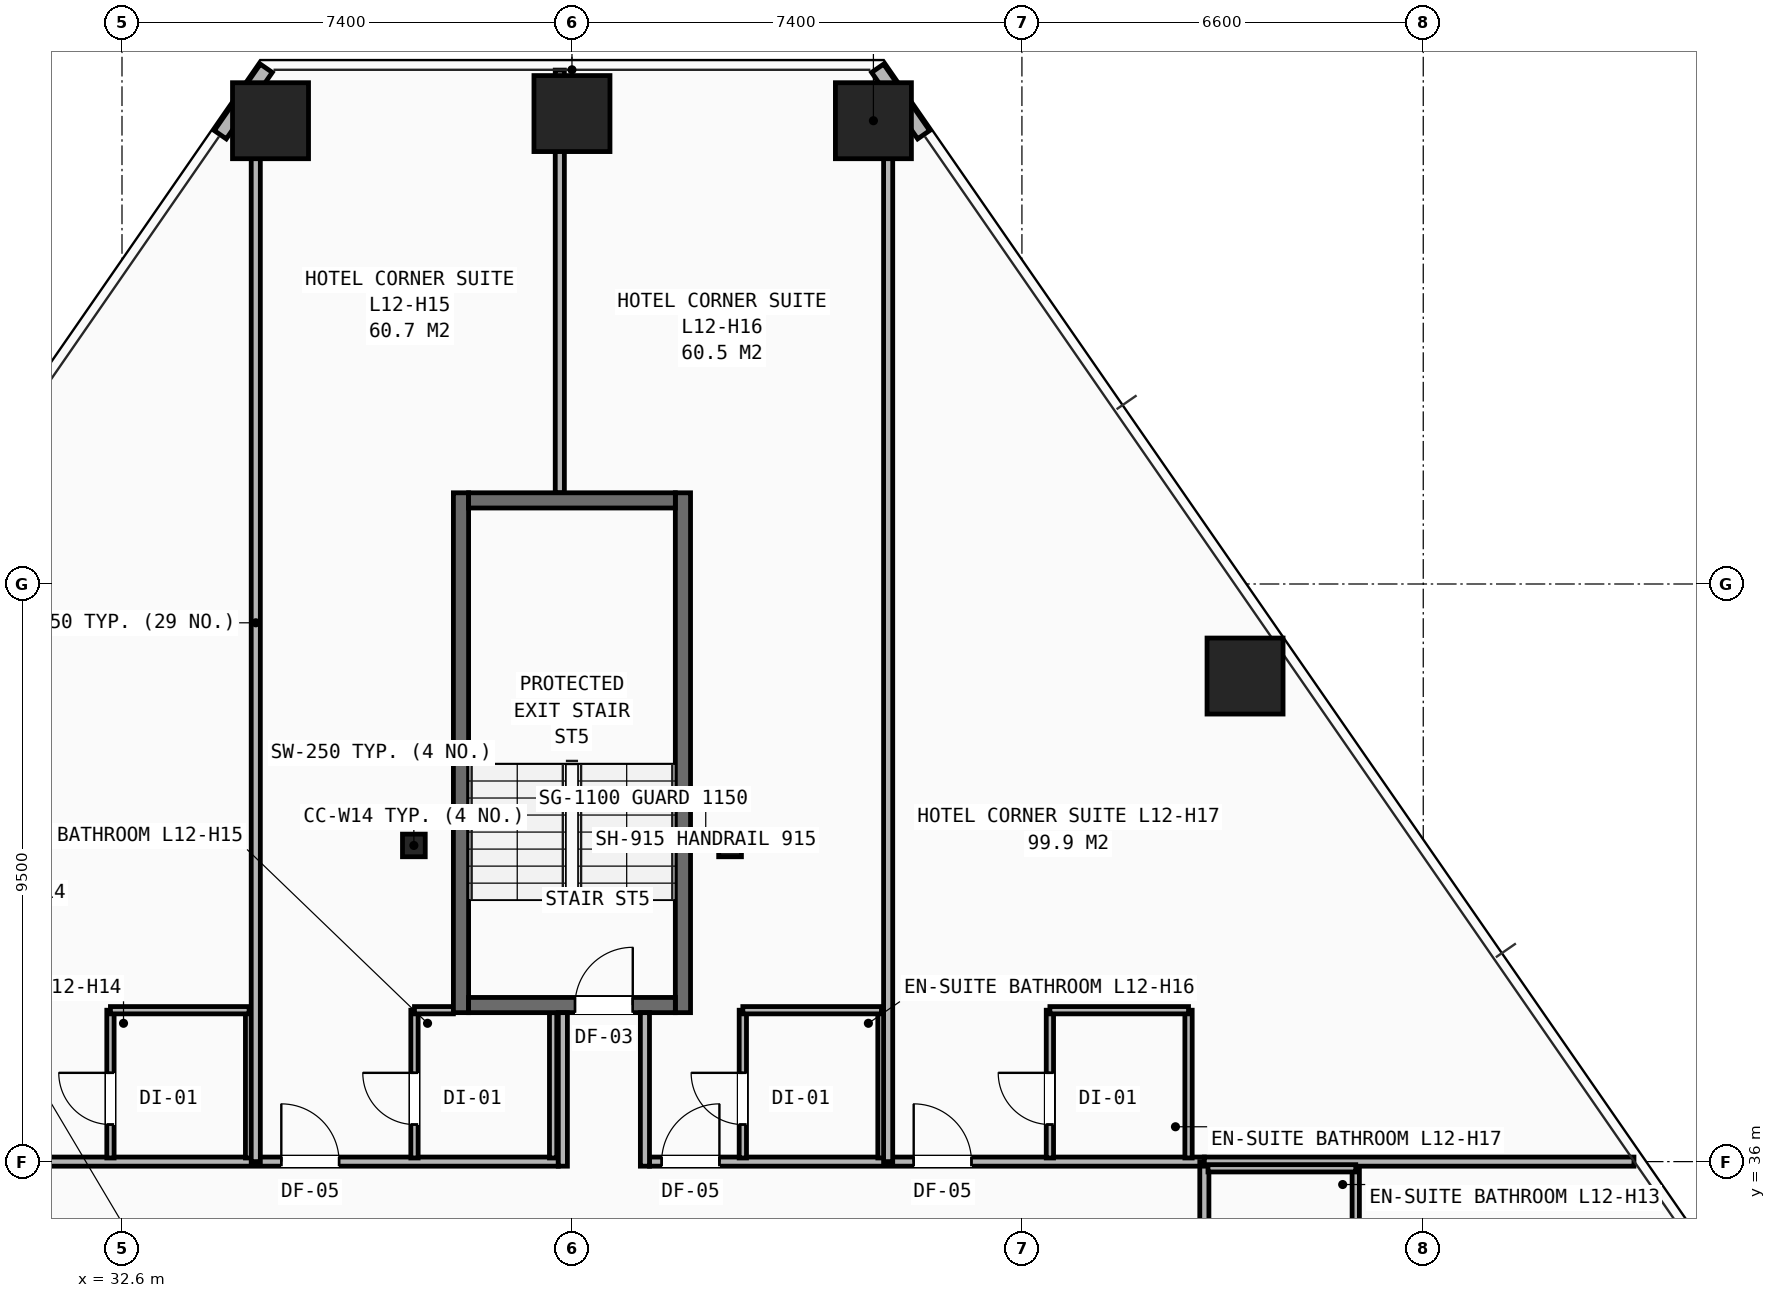
"""IFC4 building model, lengths in metres.
Left out: names, types, materials, properties, quantities, classifications, styles, units other than length and angle.
Written with IfcOpenShell. Run it as: python <this file> out.ifc"""

import sys

from ifc_helpers import new_model, si_unit, direction, frame, frame_2d, origin, origin_2d, place, context, subcontext, project, spatial, rectangle, hollow_rectangle, i_section, extrude, element, fill, save


model = new_model("IFC4")
c1 = context("Model", 3, precision=1e-05, world=origin(), true_north=direction((0.0, 1.0)))
c2 = subcontext(c1, "Body", "Model", "MODEL_VIEW")
j1 = project(units=[si_unit("LENGTHUNIT", "METRE"), si_unit("PLANEANGLEUNIT", "RADIAN")], contexts=[c1])
p1 = place(None, origin())
s1 = spatial("IfcSite", under=j1, at=p1, CompositionType="ELEMENT")
p2 = place(p1, origin())
s2 = spatial("IfcBuilding", under=s1, at=p2, CompositionType="ELEMENT")
p3 = place(p2, frame((0.0, 0.0, 46.4)))
s3 = spatial("IfcBuildingStorey", under=s2, at=p3, CompositionType="ELEMENT", Elevation=46.4)
for number, where, z_axis, x_axis in (
    (1, (37.4, 41.2, 0.0), (0.0, 0.0, 1.0), (1.0, 0.0, 0.0)),
    (2, (42.6, 41.2, 0.0), (0.0, 0.0, 1.0), (1.0, 0.0, 0.0)),
):
    element("IfcColumn", number, at=place(p3, frame(where, z_axis=z_axis, x_axis=x_axis)), inside=s3, PredefinedType="COLUMN", context=c2, shape_type="SweptSolid", body=[
        extrude(i_section(OverallWidth=0.374, OverallDepth=0.372, WebThickness=0.016, FlangeThickness=0.026, at=origin_2d()), origin(), (0.0, 0.0, 1.0), 3.2),
    ])
for number, where, z_axis, x_axis in (
    (3, (44.958, 53.12, 0.0), (0.0, 0.0, 1.0), (1.0, 0.0, 0.0)),
    (4, (40.0, 53.237, 0.0), (0.0, 0.0, 1.0), (1.0, 0.0, 0.0)),
    (5, (35.042, 53.12, 0.0), (0.0, 0.0, 1.0), (1.0, 0.0, 0.0)),
    (6, (51.069, 43.986, 0.0), (0.0, 0.0, 1.0), (1.0, 0.0, 0.0)),
):
    element("IfcColumn", number, at=place(p3, frame(where, z_axis=z_axis, x_axis=x_axis)), inside=s3, PredefinedType="COLUMN", context=c2, shape_type="SweptSolid", body=[
        extrude(hollow_rectangle(XDim=1.25, YDim=1.25, WallThickness=0.08, at=origin_2d()), origin(), (0.0, 0.0, 1.0), 3.2),
    ])
for number, where, z_axis, x_axis in (
    (7, (34.973, 53.982, 0.0), (0.0, 0.0, 1.0), (-0.569, -0.822, 0.0)),
    (8, (45.784, 52.889, 0.0), (0.0, 0.0, 1.0), (-0.569, 0.822, 0.0)),
):
    element("IfcWall", number, at=place(p3, frame(where, z_axis=z_axis, x_axis=x_axis)), inside=s3, PredefinedType="SHEAR", context=c2, shape_type="SweptSolid", body=[
        extrude(rectangle(XDim=1.33, YDim=0.24, at=frame_2d((0.665, 0.0))), origin(), (0.0, 0.0, 1.0), 2.263),
    ])
p4 = place(p3, frame((29.6, 36.0, 0.0), z_axis=(0.0, 0.0, 1.0), x_axis=(1.0, 0.0, 0.0)))
e9 = element("IfcWall", 9, at=p4, inside=s3, PredefinedType="PARTITIONING", context=c2, shape_type="SweptSolid", body=[
    extrude(rectangle(XDim=10.175, YDim=0.15, at=frame_2d((5.087, 0.0))), origin(), (0.0, 0.0, 1.0), 2.98),
])
p5 = place(p4, frame((0.57, 0.0, 0.0)))
e10 = element("IfcOpeningElement", 10, at=p5, cuts=e9, PredefinedType="OPENING", context=c2, shape_type="SweptSolid", body=[
    extrude(rectangle(XDim=0.95, YDim=2.1, at=frame_2d((0.475, 1.05))), frame((0.0, 0.085, 0.0), z_axis=(0.0, -1.0, 0.0), x_axis=(1.0, 0.0, 0.0)), (0.0, 0.0, 1.0), 0.17),
])
p6 = place(p4, frame((5.62, 0.0, 0.0)))
e11 = element("IfcOpeningElement", 11, at=p6, cuts=e9, PredefinedType="OPENING", context=c2, shape_type="SweptSolid", body=[
    extrude(rectangle(XDim=0.95, YDim=2.1, at=frame_2d((0.475, 1.05))), frame((0.0, 0.085, 0.0), z_axis=(0.0, -1.0, 0.0), x_axis=(1.0, 0.0, 0.0)), (0.0, 0.0, 1.0), 0.17),
])
p7 = place(p3, frame((41.275, 36.0, 0.0), z_axis=(0.0, 0.0, 1.0), x_axis=(1.0, 0.0, 0.0)))
e12 = element("IfcWall", 12, at=p7, inside=s3, PredefinedType="PARTITIONING", context=c2, shape_type="SweptSolid", body=[
    extrude(rectangle(XDim=9.125, YDim=0.15, at=frame_2d((4.562, 0.0))), origin(), (0.0, 0.0, 1.0), 2.513),
])
p8 = place(p7, frame((0.2, 0.0, 0.0)))
e13 = element("IfcOpeningElement", 13, at=p8, cuts=e12, PredefinedType="OPENING", context=c2, shape_type="SweptSolid", body=[
    extrude(rectangle(XDim=0.95, YDim=2.1, at=frame_2d((0.475, 1.05))), frame((0.0, 0.085, 0.0), z_axis=(0.0, -1.0, 0.0), x_axis=(1.0, 0.0, 0.0)), (0.0, 0.0, 1.0), 0.17),
])
p9 = place(p7, frame((4.345, 0.0, 0.0)))
e14 = element("IfcOpeningElement", 14, at=p9, cuts=e12, PredefinedType="OPENING", context=c2, shape_type="SweptSolid", body=[
    extrude(rectangle(XDim=0.95, YDim=2.1, at=frame_2d((0.475, 1.05))), frame((0.0, 0.085, 0.0), z_axis=(0.0, -1.0, 0.0), x_axis=(1.0, 0.0, 0.0)), (0.0, 0.0, 1.0), 0.17),
])
p10 = place(p3, frame((50.4, 14.1, 0.0), z_axis=(0.0, 0.0, 1.0), x_axis=(0.0, 1.0, 0.0)))
e15 = element("IfcWall", 15, at=p10, inside=s3, PredefinedType="PARTITIONING", context=c2, shape_type="SweptSolid", body=[
    extrude(rectangle(XDim=21.9, YDim=0.15, at=frame_2d((10.95, 0.0))), origin(), (0.0, 0.0, 1.0), 2.431),
])
p11 = place(p10, frame((0.42, 0.0, 0.0)))
e16 = element("IfcOpeningElement", 16, at=p11, cuts=e15, PredefinedType="OPENING", context=c2, shape_type="SweptSolid", body=[
    extrude(rectangle(XDim=0.95, YDim=2.1, at=frame_2d((0.475, 1.05))), frame((0.0, 0.085, 0.0), z_axis=(0.0, -1.0, 0.0), x_axis=(1.0, 0.0, 0.0)), (0.0, 0.0, 1.0), 0.17),
])
p12 = place(p10, frame((5.72, 0.0, 0.0)))
e17 = element("IfcOpeningElement", 17, at=p12, cuts=e15, PredefinedType="OPENING", context=c2, shape_type="SweptSolid", body=[
    extrude(rectangle(XDim=0.95, YDim=2.1, at=frame_2d((0.475, 1.05))), frame((0.0, 0.085, 0.0), z_axis=(0.0, -1.0, 0.0), x_axis=(1.0, 0.0, 0.0)), (0.0, 0.0, 1.0), 0.17),
])
p13 = place(p10, frame((11.12, 0.0, 0.0)))
e18 = element("IfcOpeningElement", 18, at=p13, cuts=e15, PredefinedType="OPENING", context=c2, shape_type="SweptSolid", body=[
    extrude(rectangle(XDim=0.95, YDim=2.1, at=frame_2d((0.475, 1.05))), frame((0.0, 0.085, 0.0), z_axis=(0.0, -1.0, 0.0), x_axis=(1.0, 0.0, 0.0)), (0.0, 0.0, 1.0), 0.17),
])
p14 = place(p10, frame((16.72, 0.0, 0.0)))
e19 = element("IfcOpeningElement", 19, at=p14, cuts=e15, PredefinedType="OPENING", context=c2, shape_type="SweptSolid", body=[
    extrude(rectangle(XDim=0.95, YDim=2.1, at=frame_2d((0.475, 1.05))), frame((0.0, 0.085, 0.0), z_axis=(0.0, -1.0, 0.0), x_axis=(1.0, 0.0, 0.0)), (0.0, 0.0, 1.0), 0.17),
])
p15 = place(p3, frame((50.4, 36.0, 0.0), z_axis=(0.0, 0.0, 1.0), x_axis=(1.0, 0.0, 0.0)))
e20 = element("IfcWall", 20, at=p15, inside=s3, PredefinedType="PARTITIONING", context=c2, shape_type="SweptSolid", body=[
    extrude(rectangle(XDim=7.065, YDim=0.15, at=frame_2d((3.533, 0.0))), origin(), (0.0, 0.0, 1.0), 2.268),
])
p16 = place(p3, frame((52.89, 33.61, 0.0), z_axis=(0.0, 0.0, 1.0), x_axis=(0.0, 1.0, 0.0)))
e21 = element("IfcWall", 21, at=p16, inside=s3, PredefinedType="PARTITIONING", context=c2, shape_type="SweptSolid", body=[
    extrude(rectangle(XDim=2.28, YDim=0.12, at=frame_2d((1.14, 0.0))), origin(), (0.0, 0.0, 1.0), 2.98),
])
p17 = place(p3, frame((50.46, 35.89, 0.0), z_axis=(0.0, 0.0, 1.0), x_axis=(1.0, 0.0, 0.0)))
e22 = element("IfcWall", 22, at=p17, inside=s3, PredefinedType="PARTITIONING", context=c2, shape_type="SweptSolid", body=[
    extrude(rectangle(XDim=2.43, YDim=0.12, at=frame_2d((1.215, 0.0))), origin(), (0.0, 0.0, 1.0), 2.513),
])
p18 = place(p3, frame((32.41, 36.06, 0.0), z_axis=(0.0, 0.0, 1.0), x_axis=(0.0, 1.0, 0.0)))
e23 = element("IfcWall", 23, at=p18, inside=s3, PredefinedType="PARTITIONING", context=c2, shape_type="SweptSolid", body=[
    extrude(rectangle(XDim=2.43, YDim=0.12, at=frame_2d((1.215, 0.0))), origin(), (0.0, 0.0, 1.0), 2.98),
])
p19 = place(p18, frame((0.55, 0.0, 0.0)))
e24 = element("IfcOpeningElement", 24, at=p19, cuts=e23, PredefinedType="OPENING", context=c2, shape_type="SweptSolid", body=[
    extrude(rectangle(XDim=0.85, YDim=2.05, at=frame_2d((0.425, 1.025))), frame((0.0, 0.07, 0.0), z_axis=(0.0, -1.0, 0.0), x_axis=(1.0, 0.0, 0.0)), (0.0, 0.0, 1.0), 0.14),
])
p20 = place(p3, frame((34.69, 36.06, 0.0), z_axis=(0.0, 0.0, 1.0), x_axis=(0.0, 1.0, 0.0)))
e25 = element("IfcWall", 25, at=p20, inside=s3, PredefinedType="PARTITIONING", context=c2, shape_type="SweptSolid", body=[
    extrude(rectangle(XDim=2.43, YDim=0.12, at=frame_2d((1.215, 0.0))), origin(), (0.0, 0.0, 1.0), 2.98),
])
p21 = place(p3, frame((32.41, 38.49, 0.0), z_axis=(0.0, 0.0, 1.0), x_axis=(1.0, 0.0, 0.0)))
e26 = element("IfcWall", 26, at=p21, inside=s3, PredefinedType="PARTITIONING", context=c2, shape_type="SweptSolid", body=[
    extrude(rectangle(XDim=2.28, YDim=0.12, at=frame_2d((1.14, 0.0))), origin(), (0.0, 0.0, 1.0), 2.98),
])
p22 = place(p3, frame((34.8, 36.0, 0.0), z_axis=(0.0, 0.0, 1.0), x_axis=(0.0, 1.0, 0.0)))
e27 = element("IfcWall", 27, at=p22, inside=s3, PredefinedType="PARTITIONING", context=c2, shape_type="SweptSolid", body=[
    extrude(rectangle(XDim=17.724, YDim=0.15, at=frame_2d((8.862, 0.0))), origin(), (0.0, 0.0, 1.0), 2.268),
])
p23 = place(p3, frame((37.41, 36.06, 0.0), z_axis=(0.0, 0.0, 1.0), x_axis=(0.0, 1.0, 0.0)))
e28 = element("IfcWall", 28, at=p23, inside=s3, PredefinedType="PARTITIONING", context=c2, shape_type="SweptSolid", body=[
    extrude(rectangle(XDim=2.43, YDim=0.12, at=frame_2d((1.215, 0.0))), origin(), (0.0, 0.0, 1.0), 2.98),
])
p24 = place(p23, frame((0.55, 0.0, 0.0)))
e29 = element("IfcOpeningElement", 29, at=p24, cuts=e28, PredefinedType="OPENING", context=c2, shape_type="SweptSolid", body=[
    extrude(rectangle(XDim=0.85, YDim=2.05, at=frame_2d((0.425, 1.025))), frame((0.0, 0.07, 0.0), z_axis=(0.0, -1.0, 0.0), x_axis=(1.0, 0.0, 0.0)), (0.0, 0.0, 1.0), 0.14),
])
p25 = place(p3, frame((39.69, 36.06, 0.0), z_axis=(0.0, 0.0, 1.0), x_axis=(0.0, 1.0, 0.0)))
e30 = element("IfcWall", 30, at=p25, inside=s3, PredefinedType="PARTITIONING", context=c2, shape_type="SweptSolid", body=[
    extrude(rectangle(XDim=2.39, YDim=0.12, at=frame_2d((1.195, 0.0))), origin(), (0.0, 0.0, 1.0), 2.98),
])
p26 = place(p3, frame((37.41, 38.49, 0.0), z_axis=(0.0, 0.0, 1.0), x_axis=(1.0, 0.0, 0.0)))
e31 = element("IfcWall", 31, at=p26, inside=s3, PredefinedType="PARTITIONING", context=c2, shape_type="SweptSolid", body=[
    extrude(rectangle(XDim=0.64, YDim=0.12, at=frame_2d((0.32, 0.0))), origin(), (0.0, 0.0, 1.0), 2.98),
])
p27 = place(p3, frame((39.8, 47.0, 0.0), z_axis=(0.0, 0.0, 1.0), x_axis=(0.0, 1.0, 0.0)))
e32 = element("IfcWall", 32, at=p27, inside=s3, PredefinedType="PARTITIONING", context=c2, shape_type="SweptSolid", body=[
    extrude(rectangle(XDim=6.952, YDim=0.15, at=frame_2d((3.476, 0.0))), origin(), (0.0, 0.0, 1.0), 2.268),
])
p28 = place(p3, frame((42.81, 36.06, 0.0), z_axis=(0.0, 0.0, 1.0), x_axis=(0.0, 1.0, 0.0)))
e33 = element("IfcWall", 33, at=p28, inside=s3, PredefinedType="PARTITIONING", context=c2, shape_type="SweptSolid", body=[
    extrude(rectangle(XDim=2.43, YDim=0.12, at=frame_2d((1.215, 0.0))), origin(), (0.0, 0.0, 1.0), 2.98),
])
p29 = place(p28, frame((0.55, 0.0, 0.0)))
e34 = element("IfcOpeningElement", 34, at=p29, cuts=e33, PredefinedType="OPENING", context=c2, shape_type="SweptSolid", body=[
    extrude(rectangle(XDim=0.85, YDim=2.05, at=frame_2d((0.425, 1.025))), frame((0.0, 0.07, 0.0), z_axis=(0.0, -1.0, 0.0), x_axis=(1.0, 0.0, 0.0)), (0.0, 0.0, 1.0), 0.14),
])
p30 = place(p3, frame((45.09, 36.06, 0.0), z_axis=(0.0, 0.0, 1.0), x_axis=(0.0, 1.0, 0.0)))
e35 = element("IfcWall", 35, at=p30, inside=s3, PredefinedType="PARTITIONING", context=c2, shape_type="SweptSolid", body=[
    extrude(rectangle(XDim=2.43, YDim=0.12, at=frame_2d((1.215, 0.0))), origin(), (0.0, 0.0, 1.0), 2.98),
])
p31 = place(p3, frame((42.81, 38.49, 0.0), z_axis=(0.0, 0.0, 1.0), x_axis=(1.0, 0.0, 0.0)))
e36 = element("IfcWall", 36, at=p31, inside=s3, PredefinedType="PARTITIONING", context=c2, shape_type="SweptSolid", body=[
    extrude(rectangle(XDim=2.28, YDim=0.12, at=frame_2d((1.14, 0.0))), origin(), (0.0, 0.0, 1.0), 2.98),
])
p32 = place(p3, frame((45.2, 36.0, 0.0), z_axis=(0.0, 0.0, 1.0), x_axis=(0.0, 1.0, 0.0)))
e37 = element("IfcWall", 37, at=p32, inside=s3, PredefinedType="PARTITIONING", context=c2, shape_type="SweptSolid", body=[
    extrude(rectangle(XDim=17.724, YDim=0.15, at=frame_2d((8.862, 0.0))), origin(), (0.0, 0.0, 1.0), 2.268),
])
p33 = place(p3, frame((47.86, 36.06, 0.0), z_axis=(0.0, 0.0, 1.0), x_axis=(0.0, 1.0, 0.0)))
e38 = element("IfcWall", 38, at=p33, inside=s3, PredefinedType="PARTITIONING", context=c2, shape_type="SweptSolid", body=[
    extrude(rectangle(XDim=2.43, YDim=0.12, at=frame_2d((1.215, 0.0))), origin(), (0.0, 0.0, 1.0), 2.98),
])
p34 = place(p33, frame((0.55, 0.0, 0.0)))
e39 = element("IfcOpeningElement", 39, at=p34, cuts=e38, PredefinedType="OPENING", context=c2, shape_type="SweptSolid", body=[
    extrude(rectangle(XDim=0.85, YDim=2.05, at=frame_2d((0.425, 1.025))), frame((0.0, 0.07, 0.0), z_axis=(0.0, -1.0, 0.0), x_axis=(1.0, 0.0, 0.0)), (0.0, 0.0, 1.0), 0.14),
])
p35 = place(p3, frame((50.14, 36.06, 0.0), z_axis=(0.0, 0.0, 1.0), x_axis=(0.0, 1.0, 0.0)))
e40 = element("IfcWall", 40, at=p35, inside=s3, PredefinedType="PARTITIONING", context=c2, shape_type="SweptSolid", body=[
    extrude(rectangle(XDim=2.43, YDim=0.12, at=frame_2d((1.215, 0.0))), origin(), (0.0, 0.0, 1.0), 2.513),
])
p36 = place(p3, frame((47.86, 38.49, 0.0), z_axis=(0.0, 0.0, 1.0), x_axis=(1.0, 0.0, 0.0)))
e41 = element("IfcWall", 41, at=p36, inside=s3, PredefinedType="PARTITIONING", context=c2, shape_type="SweptSolid", body=[
    extrude(rectangle(XDim=2.28, YDim=0.12, at=frame_2d((1.14, 0.0))), origin(), (0.0, 0.0, 1.0), 2.513),
])
for number, where, z_axis, x_axis in (
    (42, (38.175, 38.45, 0.0), (0.0, 0.0, 1.0), (0.0, 1.0, 0.0)),
    (43, (41.825, 38.45, 0.0), (0.0, 0.0, 1.0), (0.0, 1.0, 0.0)),
):
    element("IfcWall", number, at=place(p3, frame(where, z_axis=z_axis, x_axis=x_axis)), inside=s3, PredefinedType="SHEAR", context=c2, shape_type="SweptSolid", body=[
        extrude(rectangle(XDim=8.55, YDim=0.25, at=frame_2d((4.275, 0.0))), origin(), (0.0, 0.0, 1.0), 2.98),
    ])
p37 = place(p3, frame((38.3, 38.575, 0.0), z_axis=(0.0, 0.0, 1.0), x_axis=(1.0, 0.0, 0.0)))
e44 = element("IfcWall", 44, at=p37, inside=s3, PredefinedType="SHEAR", context=c2, shape_type="SweptSolid", body=[
    extrude(rectangle(XDim=3.4, YDim=0.25, at=frame_2d((1.7, 0.0))), origin(), (0.0, 0.0, 1.0), 2.98),
])
p38 = place(p37, frame((1.75, 0.0, 0.0)))
e45 = element("IfcOpeningElement", 45, at=p38, cuts=e44, PredefinedType="OPENING", context=c2, shape_type="SweptSolid", body=[
    extrude(rectangle(XDim=0.95, YDim=2.1, at=frame_2d((0.475, 1.05))), frame((0.0, 0.135, 0.0), z_axis=(0.0, -1.0, 0.0), x_axis=(1.0, 0.0, 0.0)), (0.0, 0.0, 1.0), 0.27),
])
p39 = place(p3, frame((38.3, 46.875, 0.0), z_axis=(0.0, 0.0, 1.0), x_axis=(1.0, 0.0, 0.0)))
e46 = element("IfcWall", 46, at=p39, inside=s3, PredefinedType="SHEAR", context=c2, shape_type="SweptSolid", body=[
    extrude(rectangle(XDim=3.4, YDim=0.25, at=frame_2d((1.7, 0.0))), origin(), (0.0, 0.0, 1.0), 2.98),
])
for number, where, z_axis, x_axis in (
    (47, (39.85, 35.925, 0.0), (0.0, 0.0, 1.0), (0.0, 1.0, 0.0)),
    (48, (41.2, 35.925, 0.0), (0.0, 0.0, 1.0), (0.0, 1.0, 0.0)),
):
    element("IfcWall", number, at=place(p3, frame(where, z_axis=z_axis, x_axis=x_axis)), inside=s3, PredefinedType="PARTITIONING", context=c2, shape_type="SweptSolid", body=[
        extrude(rectangle(XDim=2.525, YDim=0.15, at=frame_2d((1.262, 0.0))), origin(), (0.0, 0.0, 1.0), 2.98),
    ])
p40 = place(p19, origin())
e49 = element("IfcDoor", 49, at=p40, inside=s3, OperationType="SINGLE_SWING_RIGHT", PredefinedType="DOOR", context=c2, shape_type="SweptSolid", body=[
    extrude(rectangle(XDim=0.85, YDim=2.05, at=frame_2d((0.425, 1.025))), frame((0.0, 0.025, 0.0), z_axis=(0.0, -1.0, 0.0), x_axis=(1.0, 0.0, 0.0)), (0.0, 0.0, 1.0), 0.05),
])
fill(e24, e49)
p41 = place(p6, origin())
e50 = element("IfcDoor", 50, at=p41, inside=s3, OperationType="SINGLE_SWING_LEFT", PredefinedType="DOOR", context=c2, shape_type="SweptSolid", body=[
    extrude(rectangle(XDim=0.95, YDim=2.1, at=frame_2d((0.475, 1.05))), frame((0.0, 0.025, 0.0), z_axis=(0.0, -1.0, 0.0), x_axis=(1.0, 0.0, 0.0)), (0.0, 0.0, 1.0), 0.05),
])
fill(e11, e50)
p42 = place(p24, origin())
e51 = element("IfcDoor", 51, at=p42, inside=s3, OperationType="SINGLE_SWING_RIGHT", PredefinedType="DOOR", context=c2, shape_type="SweptSolid", body=[
    extrude(rectangle(XDim=0.85, YDim=2.05, at=frame_2d((0.425, 1.025))), frame((0.0, 0.025, 0.0), z_axis=(0.0, -1.0, 0.0), x_axis=(1.0, 0.0, 0.0)), (0.0, 0.0, 1.0), 0.05),
])
fill(e29, e51)
p43 = place(p8, origin())
e52 = element("IfcDoor", 52, at=p43, inside=s3, OperationType="SINGLE_SWING_RIGHT", PredefinedType="DOOR", context=c2, shape_type="SweptSolid", body=[
    extrude(rectangle(XDim=0.95, YDim=2.1, at=frame_2d((0.475, 1.05))), frame((0.0, 0.025, 0.0), z_axis=(0.0, -1.0, 0.0), x_axis=(1.0, 0.0, 0.0)), (0.0, 0.0, 1.0), 0.05),
])
fill(e13, e52)
p44 = place(p29, origin())
e53 = element("IfcDoor", 53, at=p44, inside=s3, OperationType="SINGLE_SWING_RIGHT", PredefinedType="DOOR", context=c2, shape_type="SweptSolid", body=[
    extrude(rectangle(XDim=0.85, YDim=2.05, at=frame_2d((0.425, 1.025))), frame((0.0, 0.025, 0.0), z_axis=(0.0, -1.0, 0.0), x_axis=(1.0, 0.0, 0.0)), (0.0, 0.0, 1.0), 0.05),
])
fill(e34, e53)
p45 = place(p9, origin())
e54 = element("IfcDoor", 54, at=p45, inside=s3, OperationType="SINGLE_SWING_LEFT", PredefinedType="DOOR", context=c2, shape_type="SweptSolid", body=[
    extrude(rectangle(XDim=0.95, YDim=2.1, at=frame_2d((0.475, 1.05))), frame((0.0, 0.025, 0.0), z_axis=(0.0, -1.0, 0.0), x_axis=(1.0, 0.0, 0.0)), (0.0, 0.0, 1.0), 0.05),
])
fill(e14, e54)
p46 = place(p34, origin())
e55 = element("IfcDoor", 55, at=p46, inside=s3, OperationType="SINGLE_SWING_RIGHT", PredefinedType="DOOR", context=c2, shape_type="SweptSolid", body=[
    extrude(rectangle(XDim=0.85, YDim=2.05, at=frame_2d((0.425, 1.025))), frame((0.0, 0.025, 0.0), z_axis=(0.0, -1.0, 0.0), x_axis=(1.0, 0.0, 0.0)), (0.0, 0.0, 1.0), 0.05),
])
fill(e39, e55)
p47 = place(p38, origin())
e56 = element("IfcDoor", 56, at=p47, inside=s3, OperationType="SINGLE_SWING_RIGHT", PredefinedType="DOOR", context=c2, shape_type="SweptSolid", body=[
    extrude(rectangle(XDim=0.95, YDim=2.1, at=frame_2d((0.475, 1.05))), frame((0.0, 0.025, 0.0), z_axis=(0.0, -1.0, 0.0), x_axis=(1.0, 0.0, 0.0)), (0.0, 0.0, 1.0), 0.05),
])
fill(e45, e56)
save(model, sys.argv[1])
